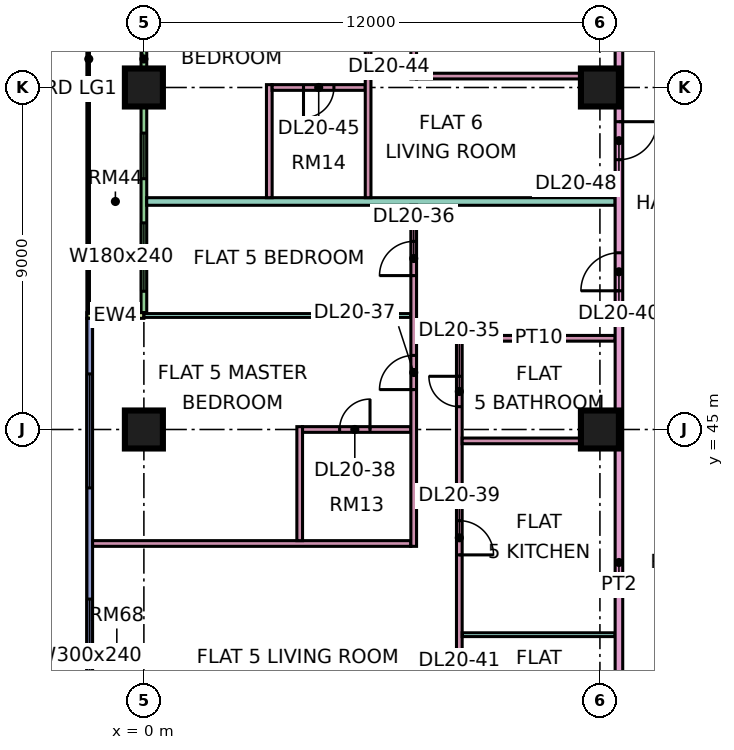
"""IFC4 building model, lengths in metres.
Left out: names, types, materials, properties, quantities, classifications, styles, units other than length and angle.
Written with IfcOpenShell. Run it as: python <this file> out.ifc"""

import sys

from ifc_helpers import new_model, si_unit, direction, frame, frame_2d, origin, origin_2d, place, context, subcontext, project, spatial, rectangle, extrude, element, fill, save


model = new_model("IFC4")
c1 = context("Model", 3, precision=1e-05, world=origin(), true_north=direction((0.0, 1.0)))
c2 = subcontext(c1, "Body", "Model", "MODEL_VIEW")
j1 = project(units=[si_unit("LENGTHUNIT", "METRE"), si_unit("PLANEANGLEUNIT", "RADIAN")], contexts=[c1])
p1 = place(None, origin())
s1 = spatial("IfcSite", under=j1, at=p1, CompositionType="ELEMENT")
p2 = place(p1, origin())
s2 = spatial("IfcBuilding", under=s1, at=p2, CompositionType="ELEMENT")
p3 = place(p2, frame((0.0, 0.0, 91.9)))
s3 = spatial("IfcBuildingStorey", under=s2, at=p3, CompositionType="ELEMENT", Elevation=91.9)
for number, where, z_axis, x_axis in (
    (1, (0.0, 45.0, 0.0), (0.0, 0.0, 1.0), (1.0, 0.0, 0.0)),
    (2, (0.0, 54.0, 0.0), (0.0, 0.0, 1.0), (1.0, 0.0, 0.0)),
    (3, (12.0, 45.0, 0.0), (0.0, 0.0, 1.0), (1.0, 0.0, 0.0)),
    (4, (12.0, 54.0, 0.0), (0.0, 0.0, 1.0), (1.0, 0.0, 0.0)),
):
    element("IfcColumn", number, at=place(p3, frame(where, z_axis=z_axis, x_axis=x_axis)), inside=s3, PredefinedType="COLUMN", context=c2, shape_type="SweptSolid", body=[
        extrude(rectangle(XDim=1.0, YDim=1.0, at=origin_2d()), origin(), (0.0, 0.0, 1.0), 3.75),
    ])
p4 = place(p3, frame((0.0, 61.425, 0.0), z_axis=(0.0, 0.0, 1.0), x_axis=(0.0, -1.0, 0.0)))
e5 = element("IfcWall", 5, at=p4, inside=s3, PredefinedType="SOLIDWALL", context=c2, shape_type="SweptSolid", body=[
    extrude(rectangle(XDim=13.35, YDim=0.15, at=frame_2d((6.675, 0.0))), origin(), (0.0, 0.0, 1.0), 3.35),
])
p5 = place(p4, frame((2.025, 0.0, 0.0)))
e6 = element("IfcOpeningElement", 6, at=p5, cuts=e5, PredefinedType="OPENING", context=c2, shape_type="SweptSolid", body=[
    extrude(rectangle(XDim=1.8, YDim=2.4, at=frame_2d((0.9, 1.2))), frame((0.0, 0.085, 0.0), z_axis=(0.0, -1.0, 0.0), x_axis=(1.0, 0.0, 0.0)), (0.0, 0.0, 1.0), 0.17),
])
p6 = place(p4, frame((5.025, 0.0, 0.45)))
e7 = element("IfcOpeningElement", 7, at=p6, cuts=e5, PredefinedType="OPENING", context=c2, shape_type="SweptSolid", body=[
    extrude(rectangle(XDim=1.2, YDim=2.4, at=frame_2d((0.6, 1.2))), frame((0.0, 0.085, 0.0), z_axis=(0.0, -1.0, 0.0), x_axis=(1.0, 0.0, 0.0)), (0.0, 0.0, 1.0), 0.17),
])
p7 = place(p4, frame((8.625, 0.0, 0.45)))
e8 = element("IfcOpeningElement", 8, at=p7, cuts=e5, PredefinedType="OPENING", context=c2, shape_type="SweptSolid", body=[
    extrude(rectangle(XDim=1.2, YDim=2.4, at=frame_2d((0.6, 1.2))), frame((0.0, 0.085, 0.0), z_axis=(0.0, -1.0, 0.0), x_axis=(1.0, 0.0, 0.0)), (0.0, 0.0, 1.0), 0.17),
])
p8 = place(p4, frame((10.988, 0.0, 0.45)))
e9 = element("IfcOpeningElement", 9, at=p8, cuts=e5, PredefinedType="OPENING", context=c2, shape_type="SweptSolid", body=[
    extrude(rectangle(XDim=1.8, YDim=2.4, at=frame_2d((0.9, 1.2))), frame((0.0, 0.085, 0.0), z_axis=(0.0, -1.0, 0.0), x_axis=(1.0, 0.0, 0.0)), (0.0, 0.0, 1.0), 0.17),
])
p9 = place(p3, frame((-1.5, 48.0, 0.0), z_axis=(0.0, 0.0, 1.0), x_axis=(1.0, 0.0, 0.0)))
e10 = element("IfcWall", 10, at=p9, inside=s3, PredefinedType="SOLIDWALL", context=c2, shape_type="SweptSolid", body=[
    extrude(rectangle(XDim=1.5, YDim=0.15, at=frame_2d((0.75, 0.0))), origin(), (0.0, 0.0, 1.0), 3.35),
])
p10 = place(p3, frame((-1.425, 47.925, 0.0), z_axis=(0.0, 0.0, 1.0), x_axis=(0.0, -1.0, 0.0)))
e11 = element("IfcWall", 11, at=p10, inside=s3, PredefinedType="SOLIDWALL", context=c2, shape_type="SweptSolid", body=[
    extrude(rectangle(XDim=11.85, YDim=0.15, at=frame_2d((5.925, 0.0))), origin(), (0.0, 0.0, 1.0), 3.35),
])
p11 = place(p10, frame((1.462, 0.0, 0.45)))
e12 = element("IfcOpeningElement", 12, at=p11, cuts=e11, PredefinedType="OPENING", context=c2, shape_type="SweptSolid", body=[
    extrude(rectangle(XDim=3.0, YDim=2.4, at=frame_2d((1.5, 1.2))), frame((0.0, 0.085, 0.0), z_axis=(0.0, -1.0, 0.0), x_axis=(1.0, 0.0, 0.0)), (0.0, 0.0, 1.0), 0.17),
])
p12 = place(p10, frame((7.387, 0.0, 0.45)))
e13 = element("IfcOpeningElement", 13, at=p12, cuts=e11, PredefinedType="OPENING", context=c2, shape_type="SweptSolid", body=[
    extrude(rectangle(XDim=3.0, YDim=2.4, at=frame_2d((1.5, 1.2))), frame((0.0, 0.085, 0.0), z_axis=(0.0, -1.0, 0.0), x_axis=(1.0, 0.0, 0.0)), (0.0, 0.0, 1.0), 0.17),
])
p13 = place(p3, frame((-1.35, 42.0, 0.0), z_axis=(0.0, 0.0, 1.0), x_axis=(1.0, 0.0, 0.0)))
e14 = element("IfcWall", 14, at=p13, inside=s3, PredefinedType="PARTITIONING", context=c2, shape_type="SweptSolid", body=[
    extrude(rectangle(XDim=8.375, YDim=0.15, at=frame_2d((4.188, 0.0))), origin(), (0.0, 0.0, 1.0), 3.35),
])
p14 = place(p3, frame((0.0, 48.0, 0.0), z_axis=(0.0, 0.0, 1.0), x_axis=(1.0, 0.0, 0.0)))
e15 = element("IfcWall", 15, at=p14, inside=s3, PredefinedType="PARTITIONING", context=c2, shape_type="SweptSolid", body=[
    extrude(rectangle(XDim=7.025, YDim=0.1, at=frame_2d((3.512, 0.0))), origin(), (0.0, 0.0, 1.0), 3.35),
])
p15 = place(p3, frame((0.074, 51.0, 0.0), z_axis=(0.0, 0.0, 1.0), x_axis=(1.0, 0.0, 0.0)))
e16 = element("IfcWall", 16, at=p15, inside=s3, PredefinedType="PARTITIONING", context=c2, shape_type="SweptSolid", body=[
    extrude(rectangle(XDim=12.326, YDim=0.2, at=frame_2d((6.163, 0.0))), origin(), (0.0, 0.0, 1.0), 3.35),
])
p16 = place(p3, frame((3.3, 51.1, 0.0), z_axis=(0.0, 0.0, 1.0), x_axis=(0.0, 1.0, 0.0)))
e17 = element("IfcWall", 17, at=p16, inside=s3, PredefinedType="PARTITIONING", context=c2, shape_type="SweptSolid", body=[
    extrude(rectangle(XDim=2.975, YDim=0.15, at=frame_2d((1.487, 0.0))), origin(), (0.0, 0.0, 1.0), 3.35),
])
p17 = place(p3, frame((3.375, 54.0, 0.0), z_axis=(0.0, 0.0, 1.0), x_axis=(1.0, 0.0, 0.0)))
e18 = element("IfcWall", 18, at=p17, inside=s3, PredefinedType="PARTITIONING", context=c2, shape_type="SweptSolid", body=[
    extrude(rectangle(XDim=2.45, YDim=0.15, at=frame_2d((1.225, 0.0))), origin(), (0.0, 0.0, 1.0), 3.35),
])
p18 = place(p17, frame((0.825, 0.0, 0.0)))
e19 = element("IfcOpeningElement", 19, at=p18, cuts=e18, PredefinedType="OPENING", context=c2, shape_type="SweptSolid", body=[
    extrude(rectangle(XDim=0.8, YDim=2.1, at=frame_2d((0.4, 1.05))), frame((0.0, 0.085, 0.0), z_axis=(0.0, -1.0, 0.0), x_axis=(1.0, 0.0, 0.0)), (0.0, 0.0, 1.0), 0.17),
])
p19 = place(p3, frame((4.1, 42.075, 0.0), z_axis=(0.0, 0.0, 1.0), x_axis=(0.0, 1.0, 0.0)))
e20 = element("IfcWall", 20, at=p19, inside=s3, PredefinedType="PARTITIONING", context=c2, shape_type="SweptSolid", body=[
    extrude(rectangle(XDim=3.0, YDim=0.15, at=frame_2d((1.5, 0.0))), origin(), (0.0, 0.0, 1.0), 3.35),
])
p20 = place(p3, frame((4.175, 45.0, 0.0), z_axis=(0.0, 0.0, 1.0), x_axis=(1.0, 0.0, 0.0)))
e21 = element("IfcWall", 21, at=p20, inside=s3, PredefinedType="PARTITIONING", context=c2, shape_type="SweptSolid", body=[
    extrude(rectangle(XDim=2.85, YDim=0.15, at=frame_2d((1.425, 0.0))), origin(), (0.0, 0.0, 1.0), 3.35),
])
p21 = place(p20, frame((0.975, 0.0, 0.0)))
e22 = element("IfcOpeningElement", 22, at=p21, cuts=e21, PredefinedType="OPENING", context=c2, shape_type="SweptSolid", body=[
    extrude(rectangle(XDim=0.8, YDim=2.1, at=frame_2d((0.4, 1.05))), frame((0.0, 0.085, 0.0), z_axis=(0.0, -1.0, 0.0), x_axis=(1.0, 0.0, 0.0)), (0.0, 0.0, 1.0), 0.17),
])
p22 = place(p3, frame((5.9, 51.1, 0.0), z_axis=(0.0, 0.0, 1.0), x_axis=(0.0, 1.0, 0.0)))
e23 = element("IfcWall", 23, at=p22, inside=s3, PredefinedType="PARTITIONING", context=c2, shape_type="SweptSolid", body=[
    extrude(rectangle(XDim=8.95, YDim=0.15, at=frame_2d((4.475, 0.0))), origin(), (0.0, 0.0, 1.0), 3.35),
])
p23 = place(p22, frame((6.95, 0.0, 0.0)))
e24 = element("IfcOpeningElement", 24, at=p23, cuts=e23, PredefinedType="OPENING", context=c2, shape_type="SweptSolid", body=[
    extrude(rectangle(XDim=0.9, YDim=2.1, at=frame_2d((0.45, 1.05))), frame((0.0, 0.085, 0.0), z_axis=(0.0, -1.0, 0.0), x_axis=(1.0, 0.0, 0.0)), (0.0, 0.0, 1.0), 0.17),
])
p24 = place(p22, frame((3.95, 0.0, 0.0)))
e25 = element("IfcOpeningElement", 25, at=p24, cuts=e23, PredefinedType="OPENING", context=c2, shape_type="SweptSolid", body=[
    extrude(rectangle(XDim=0.9, YDim=2.1, at=frame_2d((0.45, 1.05))), frame((0.0, 0.085, 0.0), z_axis=(0.0, -1.0, 0.0), x_axis=(1.0, 0.0, 0.0)), (0.0, 0.0, 1.0), 0.17),
])
p25 = place(p3, frame((7.1, 41.925, 0.0), z_axis=(0.0, 0.0, 1.0), x_axis=(0.0, 1.0, 0.0)))
e26 = element("IfcWall", 26, at=p25, inside=s3, PredefinedType="PARTITIONING", context=c2, shape_type="SweptSolid", body=[
    extrude(rectangle(XDim=8.975, YDim=0.15, at=frame_2d((4.487, 0.0))), origin(), (0.0, 0.0, 1.0), 3.35),
])
p26 = place(p25, frame((7.125, 0.0, 0.0)))
e27 = element("IfcOpeningElement", 27, at=p26, cuts=e26, PredefinedType="OPENING", context=c2, shape_type="SweptSolid", body=[
    extrude(rectangle(XDim=0.9, YDim=2.1, at=frame_2d((0.45, 1.05))), frame((0.0, 0.085, 0.0), z_axis=(0.0, -1.0, 0.0), x_axis=(1.0, 0.0, 0.0)), (0.0, 0.0, 1.0), 0.17),
])
p27 = place(p25, frame((4.125, 0.0, 0.0)))
e28 = element("IfcOpeningElement", 28, at=p27, cuts=e26, PredefinedType="OPENING", context=c2, shape_type="SweptSolid", body=[
    extrude(rectangle(XDim=0.9, YDim=2.1, at=frame_2d((0.45, 1.05))), frame((0.0, 0.085, 0.0), z_axis=(0.0, -1.0, 0.0), x_axis=(1.0, 0.0, 0.0)), (0.0, 0.0, 1.0), 0.17),
])
p28 = place(p3, frame((7.1, 54.225, 0.0), z_axis=(0.0, 0.0, 1.0), x_axis=(0.0, 1.0, 0.0)))
e29 = element("IfcWall", 29, at=p28, inside=s3, PredefinedType="PARTITIONING", context=c2, shape_type="SweptSolid", body=[
    extrude(rectangle(XDim=8.701, YDim=0.15, at=frame_2d((4.351, 0.0))), origin(), (0.0, 0.0, 1.0), 3.35),
])
p29 = place(p28, frame((1.125, 0.0, 0.0)))
e30 = element("IfcOpeningElement", 30, at=p29, cuts=e29, PredefinedType="OPENING", context=c2, shape_type="SweptSolid", body=[
    extrude(rectangle(XDim=0.8, YDim=2.1, at=frame_2d((0.4, 1.05))), frame((0.0, 0.085, 0.0), z_axis=(0.0, -1.0, 0.0), x_axis=(1.0, 0.0, 0.0)), (0.0, 0.0, 1.0), 0.17),
])
p30 = place(p28, frame((6.975, 0.0, 0.0)))
e31 = element("IfcOpeningElement", 31, at=p30, cuts=e29, PredefinedType="OPENING", context=c2, shape_type="SweptSolid", body=[
    extrude(rectangle(XDim=0.9, YDim=2.1, at=frame_2d((0.45, 1.05))), frame((0.0, 0.085, 0.0), z_axis=(0.0, -1.0, 0.0), x_axis=(1.0, 0.0, 0.0)), (0.0, 0.0, 1.0), 0.17),
])
p31 = place(p28, frame((4.125, 0.0, 0.0)))
e32 = element("IfcOpeningElement", 32, at=p31, cuts=e29, PredefinedType="OPENING", context=c2, shape_type="SweptSolid", body=[
    extrude(rectangle(XDim=0.8, YDim=2.1, at=frame_2d((0.4, 1.05))), frame((0.0, 0.085, 0.0), z_axis=(0.0, -1.0, 0.0), x_axis=(1.0, 0.0, 0.0)), (0.0, 0.0, 1.0), 0.17),
])
p32 = place(p3, frame((7.175, 54.3, 0.0), z_axis=(0.0, 0.0, 1.0), x_axis=(1.0, 0.0, 0.0)))
e33 = element("IfcWall", 33, at=p32, inside=s3, PredefinedType="PARTITIONING", context=c2, shape_type="SweptSolid", body=[
    extrude(rectangle(XDim=5.225, YDim=0.15, at=frame_2d((2.612, 0.0))), origin(), (0.0, 0.0, 1.0), 3.35),
])
p33 = place(p3, frame((8.3, 36.1, 0.0), z_axis=(0.0, 0.0, 1.0), x_axis=(0.0, 1.0, 0.0)))
e34 = element("IfcWall", 34, at=p33, inside=s3, PredefinedType="PARTITIONING", context=c2, shape_type="SweptSolid", body=[
    extrude(rectangle(XDim=11.375, YDim=0.15, at=frame_2d((5.688, 0.0))), origin(), (0.0, 0.0, 1.0), 3.35),
])
p34 = place(p33, frame((9.5, 0.0, 0.0)))
e35 = element("IfcOpeningElement", 35, at=p34, cuts=e34, PredefinedType="OPENING", context=c2, shape_type="SweptSolid", body=[
    extrude(rectangle(XDim=0.8, YDim=2.1, at=frame_2d((0.4, 1.05))), frame((0.0, 0.085, 0.0), z_axis=(0.0, -1.0, 0.0), x_axis=(1.0, 0.0, 0.0)), (0.0, 0.0, 1.0), 0.17),
])
p35 = place(p33, frame((5.6, 0.0, 0.0)))
e36 = element("IfcOpeningElement", 36, at=p35, cuts=e34, PredefinedType="OPENING", context=c2, shape_type="SweptSolid", body=[
    extrude(rectangle(XDim=0.9, YDim=2.1, at=frame_2d((0.45, 1.05))), frame((0.0, 0.085, 0.0), z_axis=(0.0, -1.0, 0.0), x_axis=(1.0, 0.0, 0.0)), (0.0, 0.0, 1.0), 0.17),
])
p36 = place(p33, frame((1.25, 0.0, 0.0)))
e37 = element("IfcOpeningElement", 37, at=p36, cuts=e34, PredefinedType="OPENING", context=c2, shape_type="SweptSolid", body=[
    extrude(rectangle(XDim=0.9, YDim=2.1, at=frame_2d((0.45, 1.05))), frame((0.0, 0.085, 0.0), z_axis=(0.0, -1.0, 0.0), x_axis=(1.0, 0.0, 0.0)), (0.0, 0.0, 1.0), 0.17),
])
p37 = place(p3, frame((8.375, 39.6, 0.0), z_axis=(0.0, 0.0, 1.0), x_axis=(1.0, 0.0, 0.0)))
e38 = element("IfcWall", 38, at=p37, inside=s3, PredefinedType="PARTITIONING", context=c2, shape_type="SweptSolid", body=[
    extrude(rectangle(XDim=4.025, YDim=0.1, at=frame_2d((2.012, 0.0))), origin(), (0.0, 0.0, 1.0), 3.35),
])
for number, where, z_axis, x_axis in (
    (39, (8.375, 44.7, 0.0), (0.0, 0.0, 1.0), (1.0, 0.0, 0.0)),
    (40, (8.375, 47.4, 0.0), (0.0, 0.0, 1.0), (1.0, 0.0, 0.0)),
):
    element("IfcWall", number, at=place(p3, frame(where, z_axis=z_axis, x_axis=x_axis)), inside=s3, PredefinedType="PARTITIONING", context=c2, shape_type="SweptSolid", body=[
        extrude(rectangle(XDim=4.025, YDim=0.15, at=frame_2d((2.012, 0.0))), origin(), (0.0, 0.0, 1.0), 3.35),
    ])
p38 = place(p3, frame((12.5, 20.0, 0.0), z_axis=(0.0, 0.0, 1.0), x_axis=(0.0, 1.0, 0.0)))
e41 = element("IfcWall", 41, at=p38, inside=s3, PredefinedType="PARTITIONING", context=c2, shape_type="SweptSolid", body=[
    extrude(rectangle(XDim=43.0, YDim=0.2, at=frame_2d((21.5, 0.0))), origin(), (0.0, 0.0, 1.0), 3.35),
])
p39 = place(p38, frame((28.65, 0.0, 0.0)))
e42 = element("IfcOpeningElement", 42, at=p39, cuts=e41, PredefinedType="OPENING", context=c2, shape_type="SweptSolid", body=[
    extrude(rectangle(XDim=1.0, YDim=2.1, at=frame_2d((0.5, 1.05))), frame((0.0, 0.11, 0.0), z_axis=(0.0, -1.0, 0.0), x_axis=(1.0, 0.0, 0.0)), (0.0, 0.0, 1.0), 0.22),
])
p40 = place(p38, frame((32.1, 0.0, 0.0)))
e43 = element("IfcOpeningElement", 43, at=p40, cuts=e41, PredefinedType="OPENING", context=c2, shape_type="SweptSolid", body=[
    extrude(rectangle(XDim=1.0, YDim=2.1, at=frame_2d((0.5, 1.05))), frame((0.0, 0.11, 0.0), z_axis=(0.0, -1.0, 0.0), x_axis=(1.0, 0.0, 0.0)), (0.0, 0.0, 1.0), 0.22),
])
p41 = place(p38, frame((0.6, 0.0, 0.0)))
e44 = element("IfcOpeningElement", 44, at=p41, cuts=e41, PredefinedType="OPENING", context=c2, shape_type="SweptSolid", body=[
    extrude(rectangle(XDim=1.2, YDim=2.1, at=frame_2d((0.6, 1.05))), frame((0.0, 0.11, 0.0), z_axis=(0.0, -1.0, 0.0), x_axis=(1.0, 0.0, 0.0)), (0.0, 0.0, 1.0), 0.22),
])
p42 = place(p38, frame((11.1, 0.0, 0.0)))
e45 = element("IfcOpeningElement", 45, at=p42, cuts=e41, PredefinedType="OPENING", context=c2, shape_type="SweptSolid", body=[
    extrude(rectangle(XDim=1.0, YDim=2.1, at=frame_2d((0.5, 1.05))), frame((0.0, 0.11, 0.0), z_axis=(0.0, -1.0, 0.0), x_axis=(1.0, 0.0, 0.0)), (0.0, 0.0, 1.0), 0.22),
])
p43 = place(p7, origin())
e46 = element("IfcWindow", 46, at=p43, inside=s3, PartitioningType="SINGLE_PANEL", PredefinedType="WINDOW", context=c2, shape_type="SweptSolid", body=[
    extrude(rectangle(XDim=1.2, YDim=2.4, at=frame_2d((0.6, 1.2))), frame((0.0, 0.03, 0.0), z_axis=(0.0, -1.0, 0.0), x_axis=(1.0, 0.0, 0.0)), (0.0, 0.0, 1.0), 0.06),
])
fill(e8, e46)
p44 = place(p8, origin())
e47 = element("IfcWindow", 47, at=p44, inside=s3, PartitioningType="SINGLE_PANEL", PredefinedType="WINDOW", context=c2, shape_type="SweptSolid", body=[
    extrude(rectangle(XDim=1.8, YDim=2.4, at=frame_2d((0.9, 1.2))), frame((0.0, 0.03, 0.0), z_axis=(0.0, -1.0, 0.0), x_axis=(1.0, 0.0, 0.0)), (0.0, 0.0, 1.0), 0.06),
])
fill(e9, e47)
p45 = place(p11, origin())
e48 = element("IfcWindow", 48, at=p45, inside=s3, PartitioningType="SINGLE_PANEL", PredefinedType="WINDOW", context=c2, shape_type="SweptSolid", body=[
    extrude(rectangle(XDim=3.0, YDim=2.4, at=frame_2d((1.5, 1.2))), frame((0.0, 0.03, 0.0), z_axis=(0.0, -1.0, 0.0), x_axis=(1.0, 0.0, 0.0)), (0.0, 0.0, 1.0), 0.06),
])
fill(e12, e48)
p46 = place(p12, origin())
e49 = element("IfcWindow", 49, at=p46, inside=s3, PartitioningType="SINGLE_PANEL", PredefinedType="WINDOW", context=c2, shape_type="SweptSolid", body=[
    extrude(rectangle(XDim=3.0, YDim=2.4, at=frame_2d((1.5, 1.2))), frame((0.0, 0.03, 0.0), z_axis=(0.0, -1.0, 0.0), x_axis=(1.0, 0.0, 0.0)), (0.0, 0.0, 1.0), 0.06),
])
fill(e13, e49)
p47 = place(p34, frame((0.8, 0.0, 0.0), z_axis=(0.0, 0.0, 1.0), x_axis=(-1.0, 0.0, 0.0)))
e50 = element("IfcDoor", 50, at=p47, inside=s3, OperationType="SINGLE_SWING_RIGHT", PredefinedType="DOOR", context=c2, shape_type="SweptSolid", body=[
    extrude(rectangle(XDim=0.8, YDim=2.1, at=frame_2d((0.4, 1.05))), frame((0.0, 0.025, 0.0), z_axis=(0.0, -1.0, 0.0), x_axis=(1.0, 0.0, 0.0)), (0.0, 0.0, 1.0), 0.05),
])
fill(e35, e50)
p48 = place(p26, origin())
e51 = element("IfcDoor", 51, at=p48, inside=s3, OperationType="SINGLE_SWING_LEFT", PredefinedType="DOOR", context=c2, shape_type="SweptSolid", body=[
    extrude(rectangle(XDim=0.9, YDim=2.1, at=frame_2d((0.45, 1.05))), frame((0.0, 0.025, 0.0), z_axis=(0.0, -1.0, 0.0), x_axis=(1.0, 0.0, 0.0)), (0.0, 0.0, 1.0), 0.05),
])
fill(e27, e51)
p49 = place(p27, origin())
e52 = element("IfcDoor", 52, at=p49, inside=s3, OperationType="SINGLE_SWING_LEFT", PredefinedType="DOOR", context=c2, shape_type="SweptSolid", body=[
    extrude(rectangle(XDim=0.9, YDim=2.1, at=frame_2d((0.45, 1.05))), frame((0.0, 0.025, 0.0), z_axis=(0.0, -1.0, 0.0), x_axis=(1.0, 0.0, 0.0)), (0.0, 0.0, 1.0), 0.05),
])
fill(e28, e52)
p50 = place(p21, frame((0.8, 0.0, 0.0), z_axis=(0.0, 0.0, 1.0), x_axis=(-1.0, 0.0, 0.0)))
e53 = element("IfcDoor", 53, at=p50, inside=s3, OperationType="SINGLE_SWING_RIGHT", PredefinedType="DOOR", context=c2, shape_type="SweptSolid", body=[
    extrude(rectangle(XDim=0.8, YDim=2.1, at=frame_2d((0.4, 1.05))), frame((0.0, 0.025, 0.0), z_axis=(0.0, -1.0, 0.0), x_axis=(1.0, 0.0, 0.0)), (0.0, 0.0, 1.0), 0.05),
])
fill(e22, e53)
p51 = place(p35, frame((0.9, 0.0, 0.0), z_axis=(0.0, 0.0, 1.0), x_axis=(-1.0, 0.0, 0.0)))
e54 = element("IfcDoor", 54, at=p51, inside=s3, OperationType="SINGLE_SWING_LEFT", PredefinedType="DOOR", context=c2, shape_type="SweptSolid", body=[
    extrude(rectangle(XDim=0.9, YDim=2.1, at=frame_2d((0.45, 1.05))), frame((0.0, 0.025, 0.0), z_axis=(0.0, -1.0, 0.0), x_axis=(1.0, 0.0, 0.0)), (0.0, 0.0, 1.0), 0.05),
])
fill(e36, e54)
p52 = place(p39, origin())
e55 = element("IfcDoor", 55, at=p52, inside=s3, OperationType="SINGLE_SWING_LEFT", PredefinedType="DOOR", context=c2, shape_type="SweptSolid", body=[
    extrude(rectangle(XDim=1.0, YDim=2.1, at=frame_2d((0.5, 1.05))), frame((0.0, 0.025, 0.0), z_axis=(0.0, -1.0, 0.0), x_axis=(1.0, 0.0, 0.0)), (0.0, 0.0, 1.0), 0.05),
])
fill(e42, e55)
p53 = place(p18, frame((0.8, 0.0, 0.0), z_axis=(0.0, 0.0, 1.0), x_axis=(-1.0, 0.0, 0.0)))
e56 = element("IfcDoor", 56, at=p53, inside=s3, OperationType="SINGLE_SWING_LEFT", PredefinedType="DOOR", context=c2, shape_type="SweptSolid", body=[
    extrude(rectangle(XDim=0.8, YDim=2.1, at=frame_2d((0.4, 1.05))), frame((0.0, 0.025, 0.0), z_axis=(0.0, -1.0, 0.0), x_axis=(1.0, 0.0, 0.0)), (0.0, 0.0, 1.0), 0.05),
])
fill(e19, e56)
p54 = place(p40, origin())
e57 = element("IfcDoor", 57, at=p54, inside=s3, OperationType="SINGLE_SWING_RIGHT", PredefinedType="DOOR", context=c2, shape_type="SweptSolid", body=[
    extrude(rectangle(XDim=1.0, YDim=2.1, at=frame_2d((0.5, 1.05))), frame((0.0, 0.025, 0.0), z_axis=(0.0, -1.0, 0.0), x_axis=(1.0, 0.0, 0.0)), (0.0, 0.0, 1.0), 0.05),
])
fill(e43, e57)
save(model, sys.argv[1])
